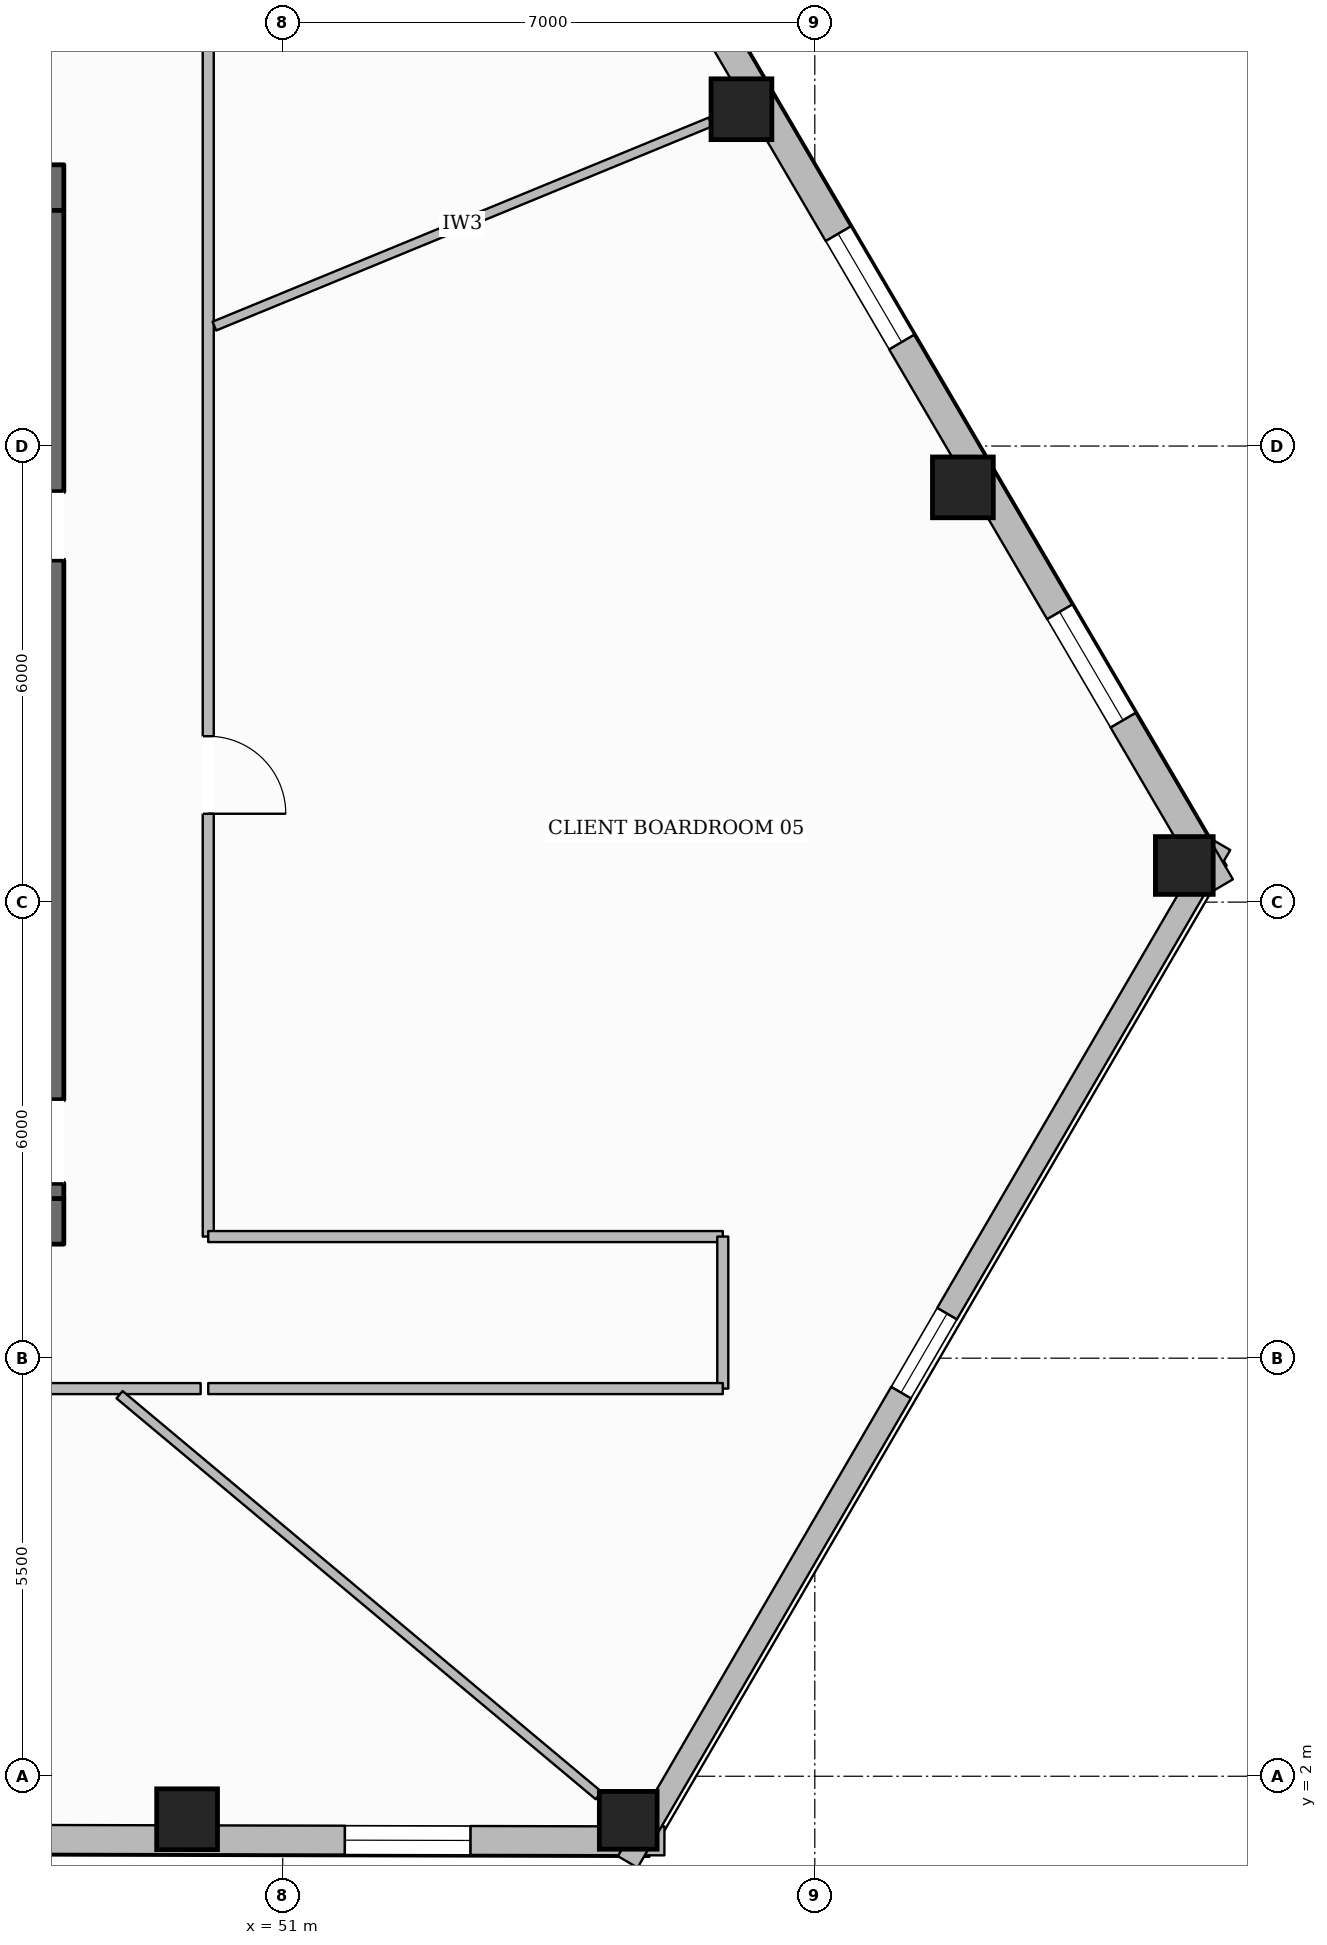
"""IFC4 building model, lengths in metres.
Left out: names, types, materials, properties, quantities, classifications, styles, units other than length and angle.
Written with IfcOpenShell. Run it as: python <this file> out.ifc"""

import sys

from ifc_helpers import new_model, si_unit, direction, frame, frame_2d, origin, origin_2d, place, context, subcontext, project, spatial, rectangle, hollow_rectangle, extrude, element, fill, save


model = new_model("IFC4")
c1 = context("Model", 3, precision=1e-05, world=origin(), true_north=direction((0.0, 1.0)))
c2 = subcontext(c1, "Body", "Model", "MODEL_VIEW")
j1 = project(units=[si_unit("LENGTHUNIT", "METRE"), si_unit("PLANEANGLEUNIT", "RADIAN")], contexts=[c1])
p1 = place(None, origin())
s1 = spatial("IfcSite", under=j1, at=p1, CompositionType="ELEMENT")
p2 = place(p1, origin())
s2 = spatial("IfcBuilding", under=s1, at=p2, CompositionType="ELEMENT")
p3 = place(p2, frame((0.0, 0.0, 56.05)))
s3 = spatial("IfcBuildingStorey", under=s2, at=p3, CompositionType="ELEMENT", Elevation=56.05)
p4 = place(p3, frame((27.88, 9.3, 0.0), z_axis=(0.0, 0.0, 1.0), x_axis=(1.0, 0.0, 0.0)))
e1 = element("IfcWall", 1, at=p4, inside=s3, PredefinedType="SOLIDWALL", context=c2, shape_type="SweptSolid", body=[
    extrude(rectangle(XDim=20.24, YDim=0.6, at=frame_2d((10.12, 0.0))), origin(), (0.0, 0.0, 1.0), 3.59),
])
p5 = place(p4, frame((10.62, 0.0, 0.0)))
e2 = element("IfcOpeningElement", 2, at=p5, cuts=e1, PredefinedType="OPENING", context=c2, shape_type="SweptSolid", body=[
    extrude(rectangle(XDim=1.4, YDim=2.2, at=frame_2d((0.7, 1.1))), frame((0.0, 0.31, 0.0), z_axis=(0.0, -1.0, 0.0), x_axis=(1.0, 0.0, 0.0)), (0.0, 0.0, 1.0), 0.62),
])
p6 = place(p3, frame((27.88, 22.9, 0.0), z_axis=(0.0, 0.0, 1.0), x_axis=(1.0, 0.0, 0.0)))
e3 = element("IfcWall", 3, at=p6, inside=s3, PredefinedType="SOLIDWALL", context=c2, shape_type="SweptSolid", body=[
    extrude(rectangle(XDim=20.24, YDim=0.6, at=frame_2d((10.12, 0.0))), origin(), (0.0, 0.0, 1.0), 3.59),
])
p7 = place(p6, frame((6.395, 0.0, 0.0)))
e4 = element("IfcOpeningElement", 4, at=p7, cuts=e3, PredefinedType="OPENING", context=c2, shape_type="SweptSolid", body=[
    extrude(rectangle(XDim=1.05, YDim=2.15, at=frame_2d((0.525, 1.075))), frame((0.0, 0.31, 0.0), z_axis=(0.0, -1.0, 0.0), x_axis=(1.0, 0.0, 0.0)), (0.0, 0.0, 1.0), 0.62),
])
p8 = place(p6, frame((12.795, 0.0, 0.0)))
e5 = element("IfcOpeningElement", 5, at=p8, cuts=e3, PredefinedType="OPENING", context=c2, shape_type="SweptSolid", body=[
    extrude(rectangle(XDim=1.05, YDim=2.15, at=frame_2d((0.525, 1.075))), frame((0.0, 0.31, 0.0), z_axis=(0.0, -1.0, 0.0), x_axis=(1.0, 0.0, 0.0)), (0.0, 0.0, 1.0), 0.62),
])
p9 = place(p3, frame((47.82, 9.6, 0.0), z_axis=(0.0, 0.0, 1.0), x_axis=(0.0, 1.0, 0.0)))
e6 = element("IfcWall", 6, at=p9, inside=s3, PredefinedType="SOLIDWALL", context=c2, shape_type="SweptSolid", body=[
    extrude(rectangle(XDim=13.0, YDim=0.6, at=frame_2d((6.5, 0.0))), origin(), (0.0, 0.0, 1.0), 3.59),
])
p10 = place(p9, frame((0.2, 0.0, 0.0)))
e7 = element("IfcOpeningElement", 7, at=p10, cuts=e6, PredefinedType="OPENING", context=c2, shape_type="SweptSolid", body=[
    extrude(rectangle(XDim=1.1, YDim=2.15, at=frame_2d((0.55, 1.075))), frame((0.0, 0.31, 0.0), z_axis=(0.0, -1.0, 0.0), x_axis=(1.0, 0.0, 0.0)), (0.0, 0.0, 1.0), 0.62),
])
p11 = place(p9, frame((8.4, 0.0, 0.0)))
e8 = element("IfcOpeningElement", 8, at=p11, cuts=e6, PredefinedType="OPENING", context=c2, shape_type="SweptSolid", body=[
    extrude(rectangle(XDim=0.9, YDim=2.1, at=frame_2d((0.45, 1.05))), frame((0.0, 0.31, 0.0), z_axis=(0.0, -1.0, 0.0), x_axis=(1.0, 0.0, 0.0)), (0.0, 0.0, 1.0), 0.62),
])
p12 = place(p3, frame((49.742, 1.434, 0.0), z_axis=(0.0, 0.0, 1.0), x_axis=(1.0, 0.0, 0.0)))
e9 = element("IfcColumn", 9, at=p12, inside=s3, PredefinedType="COLUMN", context=c2, shape_type="SweptSolid", body=[
    extrude(hollow_rectangle(XDim=0.8, YDim=0.8, WallThickness=0.036, at=origin_2d()), origin(), (0.0, 0.0, 1.0), 3.59),
])
for number, where, z_axis, x_axis in (
    (10, (55.545, 1.42, 0.0), (0.0, 0.0, 1.0), (1.0, 0.0, 0.0)),
    (11, (62.861, 13.982, 0.0), (0.0, 0.0, 1.0), (1.0, 0.0, 0.0)),
):
    element("IfcColumn", number, at=place(p3, frame(where, z_axis=z_axis, x_axis=x_axis)), inside=s3, PredefinedType="COLUMN", context=c2, shape_type="SweptSolid", body=[
        extrude(hollow_rectangle(XDim=0.76, YDim=0.76, WallThickness=0.035, at=origin_2d()), origin(), (0.0, 0.0, 1.0), 3.59),
    ])
for number, where, z_axis, x_axis in (
    (12, (59.948, 18.956, 0.0), (0.0, 0.0, 1.0), (1.0, 0.0, 0.0)),
    (13, (57.035, 23.931, 0.0), (0.0, 0.0, 1.0), (1.0, 0.0, 0.0)),
):
    element("IfcColumn", number, at=place(p3, frame(where, z_axis=z_axis, x_axis=x_axis)), inside=s3, PredefinedType="COLUMN", context=c2, shape_type="SweptSolid", body=[
        extrude(hollow_rectangle(XDim=0.8, YDim=0.8, WallThickness=0.036, at=origin_2d()), origin(), (0.0, 0.0, 1.0), 3.59),
    ])
p13 = place(p3, frame((56.021, 1.149, 0.0), z_axis=(0.0, 0.0, 1.0), x_axis=(-0.999997228104, 0.00235452441, 0.0)))
e14 = element("IfcWall", 14, at=p13, inside=s3, PredefinedType="STANDARD", context=c2, shape_type="SweptSolid", body=[
    extrude(rectangle(XDim=35.773, YDim=0.38, at=frame_2d((17.886, 0.0))), origin(), (0.0, 0.0, 1.0), 2.97),
])
p14 = place(p13, frame((31.572, 0.0, 0.65)))
e15 = element("IfcOpeningElement", 15, at=p14, cuts=e14, PredefinedType="OPENING", context=c2, shape_type="SweptSolid", body=[
    extrude(rectangle(XDim=1.65, YDim=1.75, at=frame_2d((0.825, 0.875))), frame((0.0, 0.2, 0.0), z_axis=(0.0, -1.0, 0.0), x_axis=(1.0, 0.0, 0.0)), (0.0, 0.0, 1.0), 0.4),
])
p15 = place(p13, frame((25.768, 0.0, 0.65)))
e16 = element("IfcOpeningElement", 16, at=p15, cuts=e14, PredefinedType="OPENING", context=c2, shape_type="SweptSolid", body=[
    extrude(rectangle(XDim=1.65, YDim=1.75, at=frame_2d((0.825, 0.875))), frame((0.0, 0.2, 0.0), z_axis=(0.0, -1.0, 0.0), x_axis=(1.0, 0.0, 0.0)), (0.0, 0.0, 1.0), 0.4),
])
p16 = place(p13, frame((19.964, 0.0, 0.65)))
e17 = element("IfcOpeningElement", 17, at=p16, cuts=e14, PredefinedType="OPENING", context=c2, shape_type="SweptSolid", body=[
    extrude(rectangle(XDim=1.65, YDim=1.75, at=frame_2d((0.825, 0.875))), frame((0.0, 0.2, 0.0), z_axis=(0.0, -1.0, 0.0), x_axis=(1.0, 0.0, 0.0)), (0.0, 0.0, 1.0), 0.4),
])
p17 = place(p13, frame((8.357, 0.0, 0.65)))
e18 = element("IfcOpeningElement", 18, at=p17, cuts=e14, PredefinedType="OPENING", context=c2, shape_type="SweptSolid", body=[
    extrude(rectangle(XDim=1.65, YDim=1.75, at=frame_2d((0.825, 0.875))), frame((0.0, 0.2, 0.0), z_axis=(0.0, -1.0, 0.0), x_axis=(1.0, 0.0, 0.0)), (0.0, 0.0, 1.0), 0.4),
])
p18 = place(p13, frame((2.553, 0.0, 0.65)))
e19 = element("IfcOpeningElement", 19, at=p18, cuts=e14, PredefinedType="OPENING", context=c2, shape_type="SweptSolid", body=[
    extrude(rectangle(XDim=1.65, YDim=1.75, at=frame_2d((0.825, 0.875))), frame((0.0, 0.2, 0.0), z_axis=(0.0, -1.0, 0.0), x_axis=(1.0, 0.0, 0.0)), (0.0, 0.0, 1.0), 0.4),
])
p19 = place(p3, frame((63.336, 14.261, 0.0), z_axis=(0.0, 0.0, 1.0), x_axis=(-0.503273250813, -0.864127325697, 0.0)))
e20 = element("IfcWall", 20, at=p19, inside=s3, PredefinedType="STANDARD", context=c2, shape_type="SweptSolid", body=[
    extrude(rectangle(XDim=15.493, YDim=0.3, at=frame_2d((7.747, 0.0))), origin(), (0.0, 0.0, 1.0), 2.97),
])
p20 = place(p19, frame((7.147, 0.0, 0.65)))
e21 = element("IfcOpeningElement", 21, at=p20, cuts=e20, PredefinedType="OPENING", context=c2, shape_type="SweptSolid", body=[
    extrude(rectangle(XDim=1.2, YDim=1.7, at=frame_2d((0.6, 0.85))), frame((0.0, 0.16, 0.0), z_axis=(0.0, -1.0, 0.0), x_axis=(1.0, 0.0, 0.0)), (0.0, 0.0, 1.0), 0.32),
])
p21 = place(p3, frame((45.376, 44.376, 0.0), z_axis=(0.0, 0.0, 1.0), x_axis=(0.505310833403, -0.862937403087, 0.0)))
e22 = element("IfcWall", 22, at=p21, inside=s3, PredefinedType="STANDARD", context=c2, shape_type="SweptSolid", body=[
    extrude(rectangle(XDim=35.544, YDim=0.38, at=frame_2d((17.772, 0.0))), origin(), (0.0, 0.0, 1.0), 2.97),
])
p22 = place(p21, frame((8.486, 0.0, 0.0)))
e23 = element("IfcOpeningElement", 23, at=p22, cuts=e22, PredefinedType="OPENING", context=c2, shape_type="SweptSolid", body=[
    extrude(rectangle(XDim=1.0, YDim=2.2, at=frame_2d((0.5, 1.1))), frame((0.0, 0.2, 0.0), z_axis=(0.0, -1.0, 0.0), x_axis=(1.0, 0.0, 0.0)), (0.0, 0.0, 1.0), 0.4),
])
p23 = place(p21, frame((31.356, 0.0, 0.65)))
e24 = element("IfcOpeningElement", 24, at=p23, cuts=e22, PredefinedType="OPENING", context=c2, shape_type="SweptSolid", body=[
    extrude(rectangle(XDim=1.65, YDim=1.75, at=frame_2d((0.825, 0.875))), frame((0.0, 0.2, 0.0), z_axis=(0.0, -1.0, 0.0), x_axis=(1.0, 0.0, 0.0)), (0.0, 0.0, 1.0), 0.4),
])
p24 = place(p21, frame((25.591, 0.0, 0.65)))
e25 = element("IfcOpeningElement", 25, at=p24, cuts=e22, PredefinedType="OPENING", context=c2, shape_type="SweptSolid", body=[
    extrude(rectangle(XDim=1.65, YDim=1.75, at=frame_2d((0.825, 0.875))), frame((0.0, 0.2, 0.0), z_axis=(0.0, -1.0, 0.0), x_axis=(1.0, 0.0, 0.0)), (0.0, 0.0, 1.0), 0.4),
])
p25 = place(p21, frame((19.826, 0.0, 0.65)))
e26 = element("IfcOpeningElement", 26, at=p25, cuts=e22, PredefinedType="OPENING", context=c2, shape_type="SweptSolid", body=[
    extrude(rectangle(XDim=1.65, YDim=1.75, at=frame_2d((0.825, 0.875))), frame((0.0, 0.2, 0.0), z_axis=(0.0, -1.0, 0.0), x_axis=(1.0, 0.0, 0.0)), (0.0, 0.0, 1.0), 0.4),
])
p26 = place(p21, frame((2.532, 0.0, 0.65)))
e27 = element("IfcOpeningElement", 27, at=p26, cuts=e22, PredefinedType="OPENING", context=c2, shape_type="SweptSolid", body=[
    extrude(rectangle(XDim=1.65, YDim=1.75, at=frame_2d((0.825, 0.875))), frame((0.0, 0.2, 0.0), z_axis=(0.0, -1.0, 0.0), x_axis=(1.0, 0.0, 0.0)), (0.0, 0.0, 1.0), 0.4),
])
p27 = place(p3, frame((50.02, 25.1, 0.0), z_axis=(0.0, 0.0, 1.0), x_axis=(0.0, -1.0, 0.0)))
e28 = element("IfcWall", 28, at=p27, inside=s3, PredefinedType="PARTITIONING", context=c2, shape_type="SweptSolid", body=[
    extrude(rectangle(XDim=16.0, YDim=0.145, at=frame_2d((8.0, 0.0))), origin(), (0.0, 0.0, 1.0), 3.278),
])
p28 = place(p27, frame((9.417, 0.0, 0.0)))
e29 = element("IfcOpeningElement", 29, at=p28, cuts=e28, PredefinedType="OPENING", context=c2, shape_type="SweptSolid", body=[
    extrude(rectangle(XDim=1.02, YDim=2.15, at=frame_2d((0.51, 1.075))), frame((0.0, 0.083, 0.0), z_axis=(0.0, -1.0, 0.0), x_axis=(1.0, 0.0, 0.0)), (0.0, 0.0, 1.0), 0.165),
])
p29 = place(p3, frame((50.02, 9.1, 0.0), z_axis=(0.0, 0.0, 1.0), x_axis=(1.0, 0.0, 0.0)))
e30 = element("IfcWall", 30, at=p29, inside=s3, PredefinedType="PARTITIONING", context=c2, shape_type="SweptSolid", body=[
    extrude(rectangle(XDim=6.769, YDim=0.145, at=frame_2d((3.385, 0.0))), origin(), (0.0, 0.0, 1.0), 3.59),
])
p30 = place(p3, frame((56.789, 9.1, 0.0), z_axis=(0.0, 0.0, 1.0), x_axis=(0.0, -1.0, 0.0)))
e31 = element("IfcWall", 31, at=p30, inside=s3, PredefinedType="PARTITIONING", context=c2, shape_type="SweptSolid", body=[
    extrude(rectangle(XDim=2.0, YDim=0.145, at=frame_2d((1.0, 0.0))), origin(), (0.0, 0.0, 1.0), 3.59),
])
p31 = place(p3, frame((56.789, 7.1, 0.0), z_axis=(0.0, 0.0, 1.0), x_axis=(-1.0, 0.0, 0.0)))
e32 = element("IfcWall", 32, at=p31, inside=s3, PredefinedType="PARTITIONING", context=c2, shape_type="SweptSolid", body=[
    extrude(rectangle(XDim=6.769, YDim=0.145, at=frame_2d((3.385, 0.0))), origin(), (0.0, 0.0, 1.0), 3.59),
])
p32 = place(p3, frame((49.92, 7.1, 0.0), z_axis=(0.0, 0.0, 1.0), x_axis=(-1.0, 0.0, 0.0)))
e33 = element("IfcWall", 33, at=p32, inside=s3, PredefinedType="PARTITIONING", context=c2, shape_type="SweptSolid", body=[
    extrude(rectangle(XDim=23.84, YDim=0.145, at=frame_2d((11.92, 0.0))), origin(), (0.0, 0.0, 1.0), 3.278),
])
p33 = place(p32, frame((11.91, 0.0, 0.0)))
e34 = element("IfcOpeningElement", 34, at=p33, cuts=e33, PredefinedType="OPENING", context=c2, shape_type="SweptSolid", body=[
    extrude(rectangle(XDim=1.02, YDim=2.15, at=frame_2d((0.51, 1.075))), frame((0.0, 0.083, 0.0), z_axis=(0.0, -1.0, 0.0), x_axis=(1.0, 0.0, 0.0)), (0.0, 0.0, 1.0), 0.165),
])
p34 = place(p3, frame((50.101, 21.078, 0.0), z_axis=(0.0, 0.0, 1.0), x_axis=(0.924796266477, 0.380462699237, 0.0)))
e35 = element("IfcWall", 35, at=p34, inside=s3, PredefinedType="PARTITIONING", context=c2, shape_type="SweptSolid", body=[
    extrude(rectangle(XDim=7.057, YDim=0.125, at=frame_2d((3.529, 0.0))), origin(), (0.0, 0.0, 1.0), 3.057),
])
p35 = place(p3, frame((48.853, 7.02, 0.0), z_axis=(0.0, 0.0, 1.0), x_axis=(0.766968427063, -0.641684838443, 0.0)))
e36 = element("IfcWall", 36, at=p35, inside=s3, PredefinedType="PARTITIONING", context=c2, shape_type="SweptSolid", body=[
    extrude(rectangle(XDim=8.22, YDim=0.125, at=frame_2d((4.11, 0.0))), origin(), (0.0, 0.0, 1.0), 3.057),
])
p36 = place(p18, origin())
e37 = element("IfcWindow", 37, at=p36, inside=s3, PartitioningType="SINGLE_PANEL", PredefinedType="WINDOW", context=c2, shape_type="SweptSolid", body=[
    extrude(rectangle(XDim=1.65, YDim=1.75, at=frame_2d((0.825, 0.875))), frame((0.0, 0.03, 0.0), z_axis=(0.0, -1.0, 0.0), x_axis=(1.0, 0.0, 0.0)), (0.0, 0.0, 1.0), 0.06),
])
fill(e19, e37)
p37 = place(p23, origin())
e38 = element("IfcWindow", 38, at=p37, inside=s3, PartitioningType="SINGLE_PANEL", PredefinedType="WINDOW", context=c2, shape_type="SweptSolid", body=[
    extrude(rectangle(XDim=1.65, YDim=1.75, at=frame_2d((0.825, 0.875))), frame((0.0, 0.03, 0.0), z_axis=(0.0, -1.0, 0.0), x_axis=(1.0, 0.0, 0.0)), (0.0, 0.0, 1.0), 0.06),
])
fill(e24, e38)
p38 = place(p24, origin())
e39 = element("IfcWindow", 39, at=p38, inside=s3, PartitioningType="SINGLE_PANEL", PredefinedType="WINDOW", context=c2, shape_type="SweptSolid", body=[
    extrude(rectangle(XDim=1.65, YDim=1.75, at=frame_2d((0.825, 0.875))), frame((0.0, 0.03, 0.0), z_axis=(0.0, -1.0, 0.0), x_axis=(1.0, 0.0, 0.0)), (0.0, 0.0, 1.0), 0.06),
])
fill(e25, e39)
p39 = place(p20, origin())
e40 = element("IfcWindow", 40, at=p39, inside=s3, PartitioningType="SINGLE_PANEL", PredefinedType="WINDOW", context=c2, shape_type="SweptSolid", body=[
    extrude(rectangle(XDim=1.2, YDim=1.7, at=frame_2d((0.6, 0.85))), frame((0.0, 0.03, 0.0), z_axis=(0.0, -1.0, 0.0), x_axis=(1.0, 0.0, 0.0)), (0.0, 0.0, 1.0), 0.06),
])
fill(e21, e40)
p40 = place(p28, origin())
e41 = element("IfcDoor", 41, at=p40, inside=s3, OperationType="SINGLE_SWING_RIGHT", PredefinedType="DOOR", context=c2, shape_type="SweptSolid", body=[
    extrude(rectangle(XDim=1.02, YDim=2.15, at=frame_2d((0.51, 1.075))), frame((0.0, 0.025, 0.0), z_axis=(0.0, -1.0, 0.0), x_axis=(1.0, 0.0, 0.0)), (0.0, 0.0, 1.0), 0.05),
])
fill(e29, e41)
save(model, sys.argv[1])
